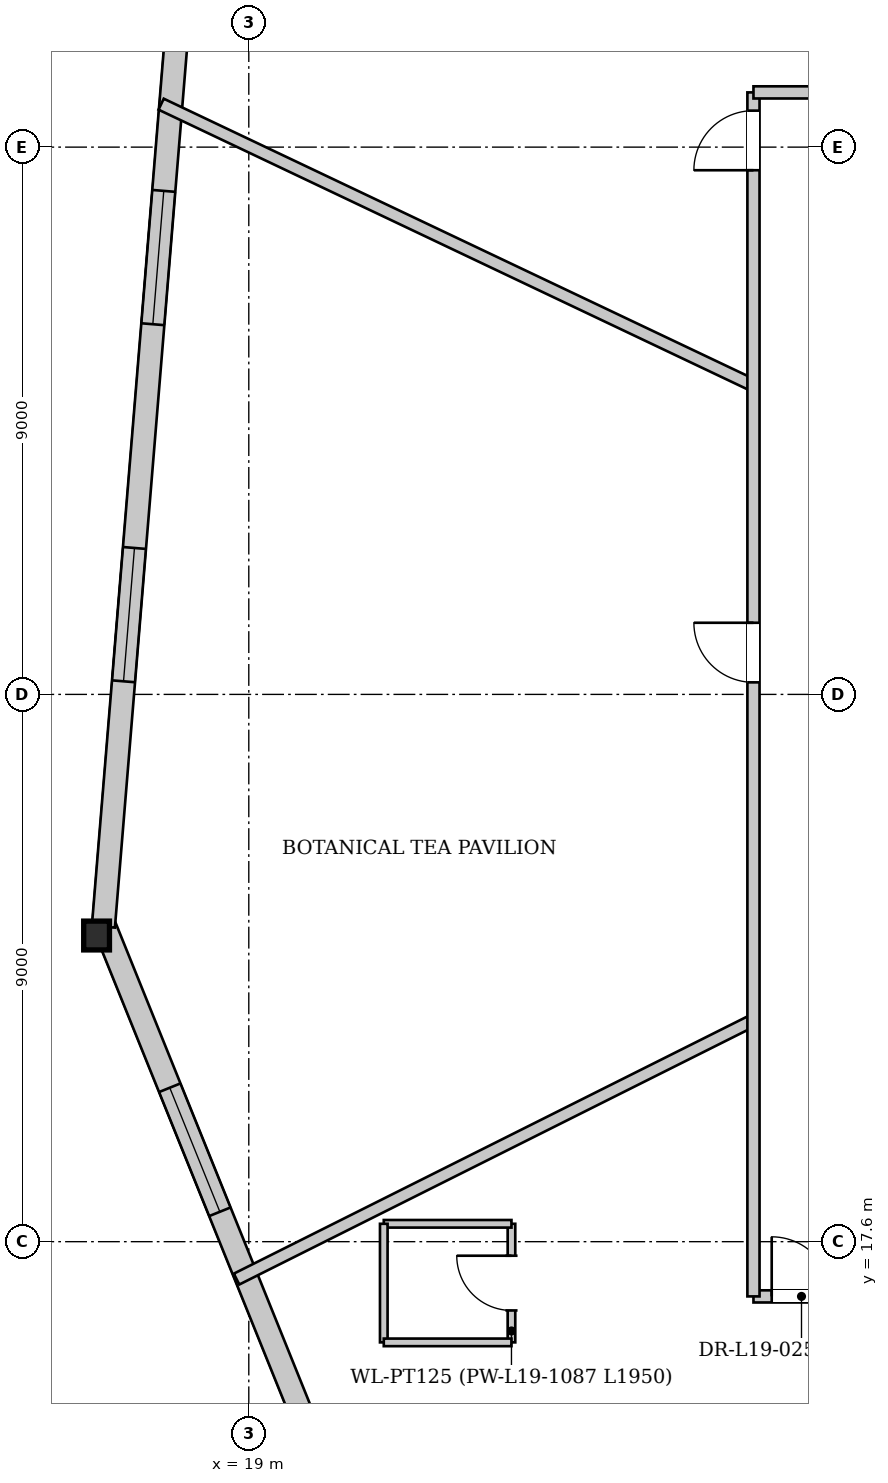
"""IFC4 building model, lengths in metres.
Left out: names, types, materials, properties, quantities, classifications, styles, units other than length and angle.
Written with IfcOpenShell. Run it as: python <this file> out.ifc"""

import sys

from ifc_helpers import new_model, si_unit, direction, frame, frame_2d, origin, origin_2d, place, context, subcontext, project, spatial, rectangle, i_section, extrude, source, transform, mapped, element, fill, save


model = new_model("IFC4")
c1 = context("Model", 3, precision=1e-05, world=origin(), true_north=direction((0.0, 1.0)))
c2 = subcontext(c1, "Body", "Model", "MODEL_VIEW")
j1 = project(units=[si_unit("LENGTHUNIT", "METRE"), si_unit("PLANEANGLEUNIT", "RADIAN")], contexts=[c1])
p1 = place(None, origin())
s1 = spatial("IfcSite", under=j1, at=p1, CompositionType="ELEMENT")
p2 = place(p1, origin())
s2 = spatial("IfcBuilding", under=s1, at=p2, CompositionType="ELEMENT")
p3 = place(p2, frame((0.0, 0.0, 75.9)))
s3 = spatial("IfcBuildingStorey", under=s2, at=p3, CompositionType="ELEMENT", Elevation=75.9)
m1 = source(origin(), c2, "Body", "SweptSolid", [
    extrude(i_section(OverallWidth=0.424, OverallDepth=0.474, WebThickness=0.043, FlangeThickness=0.068, at=origin_2d()), origin(), (0.0, 0.0, 1.0), 3.852),
])
p4 = place(p3, frame((16.419, 22.795, 0.0), z_axis=(0.040248732503, -0.08347650505, 0.995696596678), x_axis=(0.900763903388, 0.434309095407, 0.0)))
e1 = element("IfcColumn", 1, at=p4, inside=s3, PredefinedType="COLUMN", context=c2, shape_type="MappedRepresentation", body=[
    mapped(m1, transform((0.0, 0.0, 0.0), x_axis=(1.0, 0.0, 0.0), y_axis=(0.0, 1.0, 0.0), z_axis=(0.0, 0.0, 1.0), scale=1.0)),
])
p5 = place(p3, frame((23.483, 5.814, 0.0), z_axis=(0.0, 0.0, 1.0), x_axis=(-0.374542504412, 0.927209745629, 0.0)))
e2 = element("IfcWall", 2, at=p5, inside=s3, PredefinedType="SOLIDWALL", context=c2, shape_type="SweptSolid", body=[
    extrude(rectangle(XDim=18.391, YDim=0.38, at=frame_2d((9.195, 0.0))), origin(), (0.0, 0.0, 1.0), 2.872),
])
p6 = place(p5, frame((4.049, 0.0, 0.502)))
e3 = element("IfcOpeningElement", 3, at=p6, cuts=e2, PredefinedType="OPENING", context=c2, shape_type="SweptSolid", body=[
    extrude(rectangle(XDim=2.2, YDim=2.25, at=frame_2d((1.1, 1.125))), frame((0.0, 0.2, 0.0), z_axis=(0.0, -1.0, 0.0), x_axis=(1.0, 0.0, 0.0)), (0.0, 0.0, 1.0), 0.4),
])
p7 = place(p5, frame((13.241, 0.0, 0.502)))
e4 = element("IfcOpeningElement", 4, at=p7, cuts=e2, PredefinedType="OPENING", context=c2, shape_type="SweptSolid", body=[
    extrude(rectangle(XDim=2.2, YDim=2.25, at=frame_2d((1.1, 1.125))), frame((0.0, 0.2, 0.0), z_axis=(0.0, -1.0, 0.0), x_axis=(1.0, 0.0, 0.0)), (0.0, 0.0, 1.0), 0.4),
])
p8 = place(p3, frame((16.608, 22.78, 0.0), z_axis=(0.0, 0.0, 1.0), x_axis=(0.081813862086, 0.996647626782, 0.0)))
e5 = element("IfcWall", 5, at=p8, inside=s3, PredefinedType="SOLIDWALL", context=c2, shape_type="SweptSolid", body=[
    extrude(rectangle(XDim=18.391, YDim=0.38, at=frame_2d((9.196, 0.0))), origin(), (0.0, 0.0, 1.0), 2.872),
])
p9 = place(p8, frame((4.049, 0.0, 0.502)))
e6 = element("IfcOpeningElement", 6, at=p9, cuts=e5, PredefinedType="OPENING", context=c2, shape_type="SweptSolid", body=[
    extrude(rectangle(XDim=2.2, YDim=2.25, at=frame_2d((1.1, 1.125))), frame((0.0, 0.2, 0.0), z_axis=(0.0, -1.0, 0.0), x_axis=(1.0, 0.0, 0.0)), (0.0, 0.0, 1.0), 0.4),
])
p10 = place(p8, frame((9.941, 0.0, 0.502)))
e7 = element("IfcOpeningElement", 7, at=p10, cuts=e5, PredefinedType="OPENING", context=c2, shape_type="SweptSolid", body=[
    extrude(rectangle(XDim=2.2, YDim=2.25, at=frame_2d((1.1, 1.125))), frame((0.0, 0.2, 0.0), z_axis=(0.0, -1.0, 0.0), x_axis=(1.0, 0.0, 0.0)), (0.0, 0.0, 1.0), 0.4),
])
p11 = place(p3, frame((27.3, 31.681, 0.0), z_axis=(0.0, 0.0, 1.0), x_axis=(-0.903334087768, 0.428937671318, 0.0)))
e8 = element("IfcWall", 8, at=p11, inside=s3, PredefinedType="PARTITIONING", context=c2, shape_type="SweptSolid", body=[
    extrude(rectangle(XDim=10.784, YDim=0.2, at=frame_2d((5.392, 0.0))), origin(), (0.0, 0.0, 1.0), 3.58),
])
p12 = place(p3, frame((27.3, 21.242, 0.0), z_axis=(0.0, 0.0, 1.0), x_axis=(-0.894159980133, -0.447747618562, 0.0)))
e9 = element("IfcWall", 9, at=p12, inside=s3, PredefinedType="PARTITIONING", context=c2, shape_type="SweptSolid", body=[
    extrude(rectangle(XDim=9.508, YDim=0.2, at=frame_2d((4.754, 0.0))), origin(), (0.0, 0.0, 1.0), 3.58),
])
p13 = place(p3, frame((23.32, 15.944, 0.0), z_axis=(0.0, 0.0, 1.0), x_axis=(0.0, 1.0, 0.0)))
e10 = element("IfcWall", 10, at=p13, inside=s3, PredefinedType="PARTITIONING", context=c2, shape_type="SweptSolid", body=[
    extrude(rectangle(XDim=1.95, YDim=0.125, at=frame_2d((0.975, 0.0))), origin(), (0.0, 0.0, 1.0), 3.58),
])
p14 = place(p13, frame((0.525, 0.0, 0.0)))
e11 = element("IfcOpeningElement", 11, at=p14, cuts=e10, PredefinedType="OPENING", context=c2, shape_type="SweptSolid", body=[
    extrude(rectangle(XDim=0.9, YDim=2.1, at=frame_2d((0.45, 1.05))), frame((0.0, 0.073, 0.0), z_axis=(0.0, -1.0, 0.0), x_axis=(1.0, 0.0, 0.0)), (0.0, 0.0, 1.0), 0.145),
])
p15 = place(p3, frame((23.32, 17.894, 0.0), z_axis=(0.0, 0.0, 1.0), x_axis=(-1.0, 0.0, 0.0)))
e12 = element("IfcWall", 12, at=p15, inside=s3, PredefinedType="PARTITIONING", context=c2, shape_type="SweptSolid", body=[
    extrude(rectangle(XDim=2.1, YDim=0.125, at=frame_2d((1.05, 0.0))), origin(), (0.0, 0.0, 1.0), 3.58),
])
p16 = place(p3, frame((21.22, 17.894, 0.0), z_axis=(0.0, 0.0, 1.0), x_axis=(0.0, -1.0, 0.0)))
e13 = element("IfcWall", 13, at=p16, inside=s3, PredefinedType="PARTITIONING", context=c2, shape_type="SweptSolid", body=[
    extrude(rectangle(XDim=1.95, YDim=0.125, at=frame_2d((0.975, 0.0))), origin(), (0.0, 0.0, 1.0), 3.58),
])
p17 = place(p3, frame((21.22, 15.944, 0.0), z_axis=(0.0, 0.0, 1.0), x_axis=(1.0, 0.0, 0.0)))
e14 = element("IfcWall", 14, at=p17, inside=s3, PredefinedType="PARTITIONING", context=c2, shape_type="SweptSolid", body=[
    extrude(rectangle(XDim=2.1, YDim=0.125, at=frame_2d((1.05, 0.0))), origin(), (0.0, 0.0, 1.0), 3.58),
])
p18 = place(p3, frame((27.3, 16.7, 0.0), z_axis=(0.0, 0.0, 1.0), x_axis=(1.0, 0.0, 0.0)))
e15 = element("IfcWall", 15, at=p18, inside=s3, PredefinedType="PARTITIONING", context=c2, shape_type="SweptSolid", body=[
    extrude(rectangle(XDim=2.25, YDim=0.2, at=frame_2d((1.125, 0.0))), origin(), (0.0, 0.0, 1.0), 3.58),
])
p19 = place(p18, frame((0.3, 0.0, 0.0)))
e16 = element("IfcOpeningElement", 16, at=p19, cuts=e15, PredefinedType="OPENING", context=c2, shape_type="SweptSolid", body=[
    extrude(rectangle(XDim=0.98, YDim=2.15, at=frame_2d((0.49, 1.075))), frame((0.0, 0.11, 0.0), z_axis=(0.0, -1.0, 0.0), x_axis=(1.0, 0.0, 0.0)), (0.0, 0.0, 1.0), 0.22),
])
p20 = place(p3, frame((27.3, 16.7, 0.0), z_axis=(0.0, 0.0, 1.0), x_axis=(0.0, 1.0, 0.0)))
e17 = element("IfcWall", 17, at=p20, inside=s3, PredefinedType="PARTITIONING", context=c2, shape_type="SweptSolid", body=[
    extrude(rectangle(XDim=19.8, YDim=0.2, at=frame_2d((9.9, 0.0))), origin(), (0.0, 0.0, 1.0), 3.58),
])
p21 = place(p20, frame((18.52, 0.0, 0.0)))
e18 = element("IfcOpeningElement", 18, at=p21, cuts=e17, PredefinedType="OPENING", context=c2, shape_type="SweptSolid", body=[
    extrude(rectangle(XDim=0.98, YDim=2.15, at=frame_2d((0.49, 1.075))), frame((0.0, 0.11, 0.0), z_axis=(0.0, -1.0, 0.0), x_axis=(1.0, 0.0, 0.0)), (0.0, 0.0, 1.0), 0.22),
])
p22 = place(p20, frame((10.098, 0.0, 0.0)))
e19 = element("IfcOpeningElement", 19, at=p22, cuts=e17, PredefinedType="OPENING", context=c2, shape_type="SweptSolid", body=[
    extrude(rectangle(XDim=0.98, YDim=2.15, at=frame_2d((0.49, 1.075))), frame((0.0, 0.11, 0.0), z_axis=(0.0, -1.0, 0.0), x_axis=(1.0, 0.0, 0.0)), (0.0, 0.0, 1.0), 0.22),
])
p23 = place(p3, frame((27.3, 36.5, 0.0), z_axis=(0.0, 0.0, 1.0), x_axis=(1.0, 0.0, 0.0)))
e20 = element("IfcWall", 20, at=p23, inside=s3, PredefinedType="PARTITIONING", context=c2, shape_type="SweptSolid", body=[
    extrude(rectangle(XDim=21.4, YDim=0.2, at=frame_2d((10.7, 0.0))), origin(), (0.0, 0.0, 1.0), 3.58),
])
p24 = place(p23, frame((15.035, 0.0, 0.0)))
e21 = element("IfcOpeningElement", 21, at=p24, cuts=e20, PredefinedType="OPENING", context=c2, shape_type="SweptSolid", body=[
    extrude(rectangle(XDim=1.6, YDim=2.2, at=frame_2d((0.8, 1.1))), frame((0.0, 0.11, 0.0), z_axis=(0.0, -1.0, 0.0), x_axis=(1.0, 0.0, 0.0)), (0.0, 0.0, 1.0), 0.22),
])
m2 = source(origin(), c2, "Body", "SweptSolid", [
    extrude(rectangle(XDim=2.2, YDim=2.25, at=frame_2d((1.1, 1.125))), frame((0.0, 0.03, 0.0), z_axis=(0.0, -1.0, 0.0), x_axis=(1.0, 0.0, 0.0)), (0.0, 0.0, 1.0), 0.06),
])
p25 = place(p7, origin())
e22 = element("IfcWindow", 22, at=p25, inside=s3, PartitioningType="SINGLE_PANEL", PredefinedType="WINDOW", context=c2, shape_type="MappedRepresentation", body=[
    mapped(m2, transform((0.0, 0.0, 0.0), x_axis=(1.0, 0.0, 0.0), y_axis=(0.0, 1.0, 0.0), z_axis=(0.0, 0.0, 1.0), scale=1.0)),
])
fill(e4, e22)
p26 = place(p9, origin())
e23 = element("IfcWindow", 23, at=p26, inside=s3, PartitioningType="SINGLE_PANEL", PredefinedType="WINDOW", context=c2, shape_type="MappedRepresentation", body=[
    mapped(m2, transform((0.0, 0.0, 0.0), x_axis=(1.0, 0.0, 0.0), y_axis=(0.0, 1.0, 0.0), z_axis=(0.0, 0.0, 1.0), scale=1.0)),
])
fill(e6, e23)
p27 = place(p10, origin())
e24 = element("IfcWindow", 24, at=p27, inside=s3, PartitioningType="SINGLE_PANEL", PredefinedType="WINDOW", context=c2, shape_type="MappedRepresentation", body=[
    mapped(m2, transform((0.0, 0.0, 0.0), x_axis=(1.0, 0.0, 0.0), y_axis=(0.0, 1.0, 0.0), z_axis=(0.0, 0.0, 1.0), scale=1.0)),
])
fill(e7, e24)
m3 = source(origin(), c2, "Body", "SweptSolid", [
    extrude(rectangle(XDim=0.9, YDim=2.1, at=frame_2d((0.45, 1.05))), frame((0.0, 0.025, 0.0), z_axis=(0.0, -1.0, 0.0), x_axis=(1.0, 0.0, 0.0)), (0.0, 0.0, 1.0), 0.05),
])
p28 = place(p14, origin())
e25 = element("IfcDoor", 25, at=p28, inside=s3, OperationType="SINGLE_SWING_RIGHT", PredefinedType="DOOR", context=c2, shape_type="MappedRepresentation", body=[
    mapped(m3, transform((0.0, 0.0, 0.0), x_axis=(1.0, 0.0, 0.0), y_axis=(0.0, 1.0, 0.0), z_axis=(0.0, 0.0, 1.0), scale=1.0)),
])
fill(e11, e25)
m4 = source(origin(), c2, "Body", "SweptSolid", [
    extrude(rectangle(XDim=0.98, YDim=2.15, at=frame_2d((0.49, 1.075))), frame((0.0, 0.025, 0.0), z_axis=(0.0, -1.0, 0.0), x_axis=(1.0, 0.0, 0.0)), (0.0, 0.0, 1.0), 0.05),
])
p29 = place(p19, origin())
e26 = element("IfcDoor", 26, at=p29, inside=s3, OperationType="SINGLE_SWING_LEFT", PredefinedType="DOOR", context=c2, shape_type="MappedRepresentation", body=[
    mapped(m4, transform((0.0, 0.0, 0.0), x_axis=(1.0, 0.0, 0.0), y_axis=(0.0, 1.0, 0.0), z_axis=(0.0, 0.0, 1.0), scale=1.0)),
])
fill(e16, e26)
p30 = place(p21, origin())
e27 = element("IfcDoor", 27, at=p30, inside=s3, OperationType="SINGLE_SWING_LEFT", PredefinedType="DOOR", context=c2, shape_type="MappedRepresentation", body=[
    mapped(m4, transform((0.0, 0.0, 0.0), x_axis=(1.0, 0.0, 0.0), y_axis=(0.0, 1.0, 0.0), z_axis=(0.0, 0.0, 1.0), scale=1.0)),
])
fill(e18, e27)
p31 = place(p22, origin())
e28 = element("IfcDoor", 28, at=p31, inside=s3, OperationType="SINGLE_SWING_RIGHT", PredefinedType="DOOR", context=c2, shape_type="MappedRepresentation", body=[
    mapped(m4, transform((0.0, 0.0, 0.0), x_axis=(1.0, 0.0, 0.0), y_axis=(0.0, 1.0, 0.0), z_axis=(0.0, 0.0, 1.0), scale=1.0)),
])
fill(e19, e28)
save(model, sys.argv[1])
